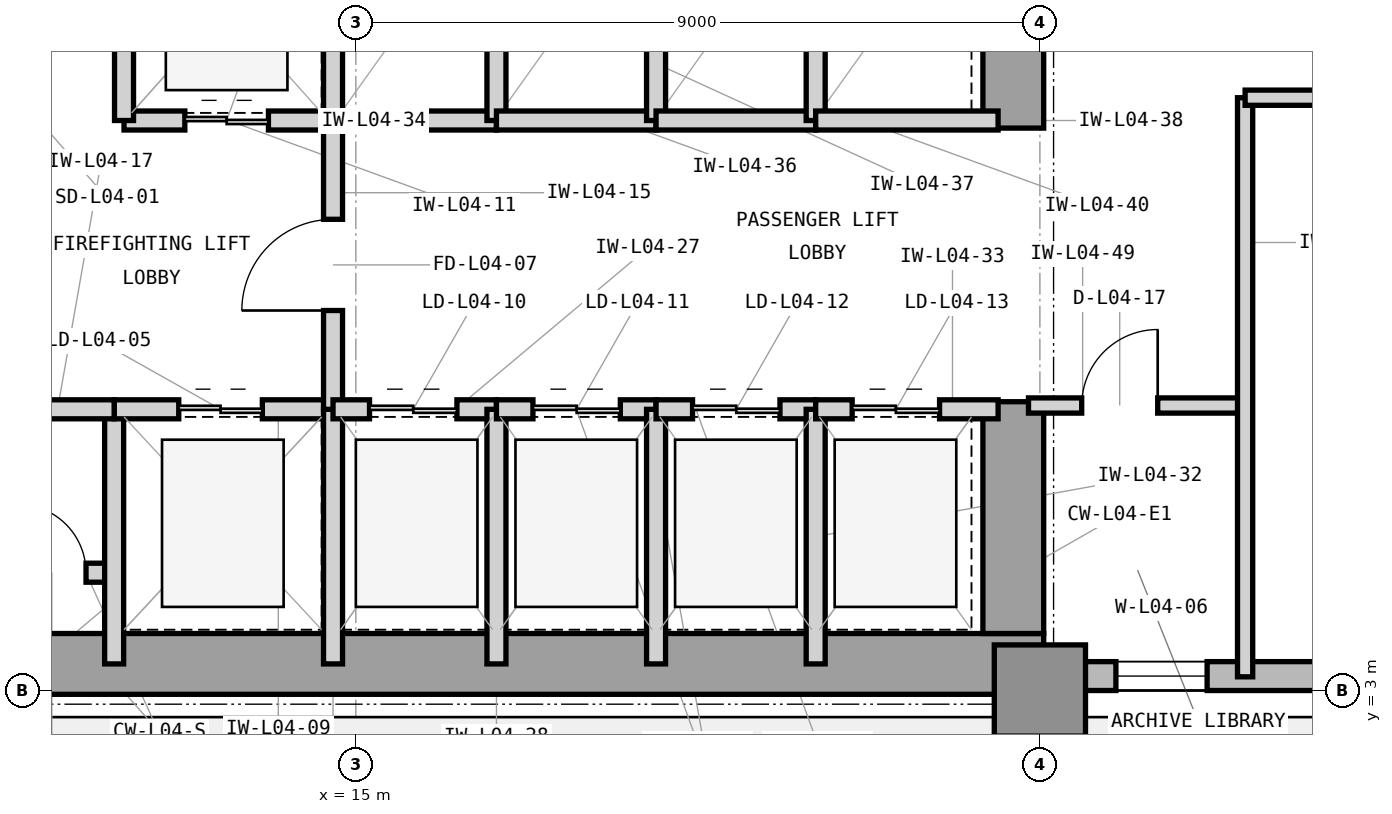
"""IFC4 building model, lengths in metres.
Left out: names, types, materials, properties, quantities, classifications, styles, units other than length and angle.
Written with IfcOpenShell. Run it as: python <this file> out.ifc"""

import sys

from ifc_helpers import new_model, si_unit, direction, frame, frame_2d, origin, origin_2d, place, context, subcontext, project, spatial, rectangle, extrude, element, fill, save


model = new_model("IFC4")
c1 = context("Model", 3, precision=1e-05, world=origin(), true_north=direction((0.0, 1.0)))
c2 = subcontext(c1, "Body", "Model", "MODEL_VIEW")
j1 = project(units=[si_unit("LENGTHUNIT", "METRE"), si_unit("PLANEANGLEUNIT", "RADIAN")], contexts=[c1])
p1 = place(None, origin())
s1 = spatial("IfcSite", under=j1, at=p1, CompositionType="ELEMENT")
p2 = place(p1, origin())
s2 = spatial("IfcBuilding", under=s1, at=p2, CompositionType="ELEMENT")
p3 = place(p2, frame((0.0, 0.0, 21.6)))
s3 = spatial("IfcBuildingStorey", under=s2, at=p3, CompositionType="ELEMENT", Elevation=21.6)
p4 = place(p3, frame((7.475, 3.35, 0.0), z_axis=(0.0, 0.0, 1.0), x_axis=(1.0, 0.0, 0.0)))
e1 = element("IfcWall", 1, at=p4, inside=s3, PredefinedType="SHEAR", context=c2, shape_type="SweptSolid", body=[
    extrude(rectangle(XDim=16.575, YDim=0.8, at=frame_2d((8.288, 0.0))), origin(), (0.0, 0.0, 1.0), 4.2),
])
p5 = place(p3, frame((23.65, 3.75, 0.0), z_axis=(0.0, 0.0, 1.0), x_axis=(0.0, 1.0, 0.0)))
e2 = element("IfcWall", 2, at=p5, inside=s3, PredefinedType="SHEAR", context=c2, shape_type="SweptSolid", body=[
    extrude(rectangle(XDim=3.05, YDim=0.8, at=frame_2d((1.525, 0.0))), origin(), (0.0, 0.0, 1.0), 4.2),
])
p6 = place(p3, frame((23.65, 10.4, 0.0), z_axis=(0.0, 0.0, 1.0), x_axis=(0.0, 1.0, 0.0)))
e3 = element("IfcWall", 3, at=p6, inside=s3, PredefinedType="SHEAR", context=c2, shape_type="SweptSolid", body=[
    extrude(rectangle(XDim=3.2, YDim=0.8, at=frame_2d((1.6, 0.0))), origin(), (0.0, 0.0, 1.0), 4.2),
])
p7 = place(p3, frame((24.0, 3.0, 0.0), z_axis=(0.0, 0.0, 1.0), x_axis=(1.0, 0.0, 0.0)))
e4 = element("IfcColumn", 4, at=p7, inside=s3, PredefinedType="COLUMN", context=c2, shape_type="SweptSolid", body=[
    extrude(rectangle(XDim=1.2, YDim=1.2, at=origin_2d()), origin(), (0.0, 0.0, 1.0), 4.2),
])
p8 = place(p3, frame((23.9, 3.19, 0.0), z_axis=(0.0, 0.0, 1.0), x_axis=(1.0, 0.0, 0.0)))
e5 = element("IfcWall", 5, at=p8, inside=s3, PredefinedType="STANDARD", context=c2, shape_type="SweptSolid", body=[
    extrude(rectangle(XDim=40.5, YDim=0.38, at=frame_2d((20.25, 0.0))), origin(), (0.0, 0.0, 1.0), 3.98),
])
p9 = place(p8, frame((1.1, 0.0, 0.85)))
e6 = element("IfcOpeningElement", 6, at=p9, cuts=e5, PredefinedType="OPENING", context=c2, shape_type="SweptSolid", body=[
    extrude(rectangle(XDim=1.2, YDim=2.45, at=frame_2d((0.6, 1.225))), frame((0.0, 0.2, 0.0), z_axis=(0.0, -1.0, 0.0), x_axis=(1.0, 0.0, 0.0)), (0.0, 0.0, 1.0), 0.4),
])
p10 = place(p8, frame((10.054, 0.0, 0.85)))
e7 = element("IfcOpeningElement", 7, at=p10, cuts=e5, PredefinedType="OPENING", context=c2, shape_type="SweptSolid", body=[
    extrude(rectangle(XDim=2.8, YDim=2.45, at=frame_2d((1.4, 1.225))), frame((0.0, 0.2, 0.0), z_axis=(0.0, -1.0, 0.0), x_axis=(1.0, 0.0, 0.0)), (0.0, 0.0, 1.0), 0.4),
])
p11 = place(p8, frame((20.304, 0.0, 0.85)))
e8 = element("IfcOpeningElement", 8, at=p11, cuts=e5, PredefinedType="OPENING", context=c2, shape_type="SweptSolid", body=[
    extrude(rectangle(XDim=2.8, YDim=2.45, at=frame_2d((1.4, 1.225))), frame((0.0, 0.2, 0.0), z_axis=(0.0, -1.0, 0.0), x_axis=(1.0, 0.0, 0.0)), (0.0, 0.0, 1.0), 0.4),
])
p12 = place(p8, frame((31.104, 0.0, 0.85)))
e9 = element("IfcOpeningElement", 9, at=p12, cuts=e5, PredefinedType="OPENING", context=c2, shape_type="SweptSolid", body=[
    extrude(rectangle(XDim=1.2, YDim=2.45, at=frame_2d((0.6, 1.225))), frame((0.0, 0.2, 0.0), z_axis=(0.0, -1.0, 0.0), x_axis=(1.0, 0.0, 0.0)), (0.0, 0.0, 1.0), 0.4),
])
p13 = place(p3, frame((10.33, 4.55, 0.0), z_axis=(0.0, 0.0, 1.0), x_axis=(1.0, 0.0, 0.0)))
e10 = element("IfcWall", 10, at=p13, inside=s3, PredefinedType="PARTITIONING", context=c2, shape_type="SweptSolid", body=[
    extrude(rectangle(XDim=1.49, YDim=0.25, at=frame_2d((0.745, 0.0))), origin(), (0.0, 0.0, 1.0), 3.97),
])
p14 = place(p13, frame((0.22, 0.0, 0.0)))
e11 = element("IfcOpeningElement", 11, at=p14, cuts=e10, PredefinedType="OPENING", context=c2, shape_type="SweptSolid", body=[
    extrude(rectangle(XDim=0.9, YDim=2.1, at=frame_2d((0.45, 1.05))), frame((0.0, 0.135, 0.0), z_axis=(0.0, -1.0, 0.0), x_axis=(1.0, 0.0, 0.0)), (0.0, 0.0, 1.0), 0.27),
])
p15 = place(p3, frame((11.82, 3.35, 0.0), z_axis=(0.0, 0.0, 1.0), x_axis=(0.0, 1.0, 0.0)))
e12 = element("IfcWall", 12, at=p15, inside=s3, PredefinedType="PARTITIONING", context=c2, shape_type="SweptSolid", body=[
    extrude(rectangle(XDim=3.35, YDim=0.25, at=frame_2d((1.675, 0.0))), origin(), (0.0, 0.0, 1.0), 3.97),
])
p16 = place(p3, frame((11.82, 6.7, 0.0), z_axis=(0.0, 0.0, 1.0), x_axis=(1.0, 0.0, 0.0)))
e13 = element("IfcWall", 13, at=p16, inside=s3, PredefinedType="PARTITIONING", context=c2, shape_type="SweptSolid", body=[
    extrude(rectangle(XDim=2.88, YDim=0.25, at=frame_2d((1.44, 0.0))), origin(), (0.0, 0.0, 1.0), 3.426),
])
p17 = place(p16, frame((0.85, 0.0, 0.0)))
e14 = element("IfcOpeningElement", 14, at=p17, cuts=e13, PredefinedType="OPENING", context=c2, shape_type="SweptSolid", body=[
    extrude(rectangle(XDim=1.1, YDim=2.25, at=frame_2d((0.55, 1.125))), frame((0.0, 0.135, 0.0), z_axis=(0.0, -1.0, 0.0), x_axis=(1.0, 0.0, 0.0)), (0.0, 0.0, 1.0), 0.27),
])
p18 = place(p3, frame((14.7, 3.35, 0.0), z_axis=(0.0, 0.0, 1.0), x_axis=(0.0, 1.0, 0.0)))
e15 = element("IfcWall", 15, at=p18, inside=s3, PredefinedType="PARTITIONING", context=c2, shape_type="SweptSolid", body=[
    extrude(rectangle(XDim=3.35, YDim=0.25, at=frame_2d((1.675, 0.0))), origin(), (0.0, 0.0, 1.0), 3.97),
])
p19 = place(p3, frame((11.95, 10.5, 0.0), z_axis=(0.0, 0.0, 1.0), x_axis=(1.0, 0.0, 0.0)))
e16 = element("IfcWall", 16, at=p19, inside=s3, PredefinedType="PARTITIONING", context=c2, shape_type="SweptSolid", body=[
    extrude(rectangle(XDim=2.75, YDim=0.25, at=frame_2d((1.375, 0.0))), origin(), (0.0, 0.0, 1.0), 3.426),
])
p20 = place(p19, frame((0.8, 0.0, 0.0)))
e17 = element("IfcOpeningElement", 17, at=p20, cuts=e16, PredefinedType="OPENING", context=c2, shape_type="SweptSolid", body=[
    extrude(rectangle(XDim=1.1, YDim=2.25, at=frame_2d((0.55, 1.125))), frame((0.0, 0.135, 0.0), z_axis=(0.0, -1.0, 0.0), x_axis=(1.0, 0.0, 0.0)), (0.0, 0.0, 1.0), 0.27),
])
for number, where, z_axis, x_axis in (
    (18, (11.95, 10.5, 0.0), (0.0, 0.0, 1.0), (0.0, 1.0, 0.0)),
    (19, (14.7, 10.5, 0.0), (0.0, 0.0, 1.0), (0.0, 1.0, 0.0)),
):
    element("IfcWall", number, at=place(p3, frame(where, z_axis=z_axis, x_axis=x_axis)), inside=s3, PredefinedType="PARTITIONING", context=c2, shape_type="SweptSolid", body=[
        extrude(rectangle(XDim=3.0, YDim=0.25, at=frame_2d((1.5, 0.0))), origin(), (0.0, 0.0, 1.0), 3.97),
    ])
p21 = place(p3, frame((14.7, 6.7, 0.0), z_axis=(0.0, 0.0, 1.0), x_axis=(0.0, 1.0, 0.0)))
e20 = element("IfcWall", 20, at=p21, inside=s3, PredefinedType="PARTITIONING", context=c2, shape_type="SweptSolid", body=[
    extrude(rectangle(XDim=3.8, YDim=0.25, at=frame_2d((1.9, 0.0))), origin(), (0.0, 0.0, 1.0), 3.97),
])
p22 = place(p21, frame((1.3, 0.0, 0.0)))
e21 = element("IfcOpeningElement", 21, at=p22, cuts=e20, PredefinedType="OPENING", context=c2, shape_type="SweptSolid", body=[
    extrude(rectangle(XDim=1.2, YDim=2.2, at=frame_2d((0.6, 1.1))), frame((0.0, 0.135, 0.0), z_axis=(0.0, -1.0, 0.0), x_axis=(1.0, 0.0, 0.0)), (0.0, 0.0, 1.0), 0.27),
])
p23 = place(p3, frame((10.33, 6.7, 0.0), z_axis=(0.0, 0.0, 1.0), x_axis=(1.0, 0.0, 0.0)))
e22 = element("IfcWall", 22, at=p23, inside=s3, PredefinedType="PARTITIONING", context=c2, shape_type="SweptSolid", body=[
    extrude(rectangle(XDim=1.49, YDim=0.25, at=frame_2d((0.745, 0.0))), origin(), (0.0, 0.0, 1.0), 3.426),
])
p24 = place(p3, frame((14.7, 6.7, 0.0), z_axis=(0.0, 0.0, 1.0), x_axis=(1.0, 0.0, 0.0)))
e23 = element("IfcWall", 23, at=p24, inside=s3, PredefinedType="PARTITIONING", context=c2, shape_type="SweptSolid", body=[
    extrude(rectangle(XDim=2.15, YDim=0.25, at=frame_2d((1.075, 0.0))), origin(), (0.0, 0.0, 1.0), 3.426),
])
p25 = place(p24, frame((0.48, 0.0, 0.0)))
e24 = element("IfcOpeningElement", 24, at=p25, cuts=e23, PredefinedType="OPENING", context=c2, shape_type="SweptSolid", body=[
    extrude(rectangle(XDim=1.15, YDim=2.25, at=frame_2d((0.575, 1.125))), frame((0.0, 0.135, 0.0), z_axis=(0.0, -1.0, 0.0), x_axis=(1.0, 0.0, 0.0)), (0.0, 0.0, 1.0), 0.27),
])
p26 = place(p3, frame((16.85, 3.35, 0.0), z_axis=(0.0, 0.0, 1.0), x_axis=(0.0, 1.0, 0.0)))
e25 = element("IfcWall", 25, at=p26, inside=s3, PredefinedType="PARTITIONING", context=c2, shape_type="SweptSolid", body=[
    extrude(rectangle(XDim=3.35, YDim=0.25, at=frame_2d((1.675, 0.0))), origin(), (0.0, 0.0, 1.0), 3.97),
])
p27 = place(p3, frame((16.85, 6.7, 0.0), z_axis=(0.0, 0.0, 1.0), x_axis=(1.0, 0.0, 0.0)))
e26 = element("IfcWall", 26, at=p27, inside=s3, PredefinedType="PARTITIONING", context=c2, shape_type="SweptSolid", body=[
    extrude(rectangle(XDim=2.1, YDim=0.25, at=frame_2d((1.05, 0.0))), origin(), (0.0, 0.0, 1.0), 3.426),
])
p28 = place(p27, frame((0.48, 0.0, 0.0)))
e27 = element("IfcOpeningElement", 27, at=p28, cuts=e26, PredefinedType="OPENING", context=c2, shape_type="SweptSolid", body=[
    extrude(rectangle(XDim=1.15, YDim=2.25, at=frame_2d((0.575, 1.125))), frame((0.0, 0.135, 0.0), z_axis=(0.0, -1.0, 0.0), x_axis=(1.0, 0.0, 0.0)), (0.0, 0.0, 1.0), 0.27),
])
p29 = place(p3, frame((18.95, 3.35, 0.0), z_axis=(0.0, 0.0, 1.0), x_axis=(0.0, 1.0, 0.0)))
e28 = element("IfcWall", 28, at=p29, inside=s3, PredefinedType="PARTITIONING", context=c2, shape_type="SweptSolid", body=[
    extrude(rectangle(XDim=3.35, YDim=0.25, at=frame_2d((1.675, 0.0))), origin(), (0.0, 0.0, 1.0), 3.97),
])
p30 = place(p3, frame((18.95, 6.7, 0.0), z_axis=(0.0, 0.0, 1.0), x_axis=(1.0, 0.0, 0.0)))
e29 = element("IfcWall", 29, at=p30, inside=s3, PredefinedType="PARTITIONING", context=c2, shape_type="SweptSolid", body=[
    extrude(rectangle(XDim=2.1, YDim=0.25, at=frame_2d((1.05, 0.0))), origin(), (0.0, 0.0, 1.0), 3.426),
])
p31 = place(p30, frame((0.48, 0.0, 0.0)))
e30 = element("IfcOpeningElement", 30, at=p31, cuts=e29, PredefinedType="OPENING", context=c2, shape_type="SweptSolid", body=[
    extrude(rectangle(XDim=1.15, YDim=2.25, at=frame_2d((0.575, 1.125))), frame((0.0, 0.135, 0.0), z_axis=(0.0, -1.0, 0.0), x_axis=(1.0, 0.0, 0.0)), (0.0, 0.0, 1.0), 0.27),
])
p32 = place(p3, frame((21.05, 3.35, 0.0), z_axis=(0.0, 0.0, 1.0), x_axis=(0.0, 1.0, 0.0)))
e31 = element("IfcWall", 31, at=p32, inside=s3, PredefinedType="PARTITIONING", context=c2, shape_type="SweptSolid", body=[
    extrude(rectangle(XDim=3.35, YDim=0.25, at=frame_2d((1.675, 0.0))), origin(), (0.0, 0.0, 1.0), 3.97),
])
p33 = place(p3, frame((21.05, 6.7, 0.0), z_axis=(0.0, 0.0, 1.0), x_axis=(1.0, 0.0, 0.0)))
e32 = element("IfcWall", 32, at=p33, inside=s3, PredefinedType="PARTITIONING", context=c2, shape_type="SweptSolid", body=[
    extrude(rectangle(XDim=2.4, YDim=0.25, at=frame_2d((1.2, 0.0))), origin(), (0.0, 0.0, 1.0), 3.426),
])
p34 = place(p33, frame((0.48, 0.0, 0.0)))
e33 = element("IfcOpeningElement", 33, at=p34, cuts=e32, PredefinedType="OPENING", context=c2, shape_type="SweptSolid", body=[
    extrude(rectangle(XDim=1.15, YDim=2.25, at=frame_2d((0.575, 1.125))), frame((0.0, 0.135, 0.0), z_axis=(0.0, -1.0, 0.0), x_axis=(1.0, 0.0, 0.0)), (0.0, 0.0, 1.0), 0.27),
])
p35 = place(p3, frame((14.7, 10.5, 0.0), z_axis=(0.0, 0.0, 1.0), x_axis=(1.0, 0.0, 0.0)))
e34 = element("IfcWall", 34, at=p35, inside=s3, PredefinedType="PARTITIONING", context=c2, shape_type="SweptSolid", body=[
    extrude(rectangle(XDim=2.15, YDim=0.25, at=frame_2d((1.075, 0.0))), origin(), (0.0, 0.0, 1.0), 3.426),
])
p36 = place(p3, frame((16.85, 10.5, 0.0), z_axis=(0.0, 0.0, 1.0), x_axis=(0.0, 1.0, 0.0)))
e35 = element("IfcWall", 35, at=p36, inside=s3, PredefinedType="PARTITIONING", context=c2, shape_type="SweptSolid", body=[
    extrude(rectangle(XDim=3.0, YDim=0.25, at=frame_2d((1.5, 0.0))), origin(), (0.0, 0.0, 1.0), 3.97),
])
p37 = place(p3, frame((16.85, 10.5, 0.0), z_axis=(0.0, 0.0, 1.0), x_axis=(1.0, 0.0, 0.0)))
e36 = element("IfcWall", 36, at=p37, inside=s3, PredefinedType="PARTITIONING", context=c2, shape_type="SweptSolid", body=[
    extrude(rectangle(XDim=2.1, YDim=0.25, at=frame_2d((1.05, 0.0))), origin(), (0.0, 0.0, 1.0), 3.426),
])
p38 = place(p3, frame((18.95, 10.5, 0.0), z_axis=(0.0, 0.0, 1.0), x_axis=(0.0, 1.0, 0.0)))
e37 = element("IfcWall", 37, at=p38, inside=s3, PredefinedType="PARTITIONING", context=c2, shape_type="SweptSolid", body=[
    extrude(rectangle(XDim=3.0, YDim=0.25, at=frame_2d((1.5, 0.0))), origin(), (0.0, 0.0, 1.0), 3.97),
])
p39 = place(p3, frame((18.95, 10.5, 0.0), z_axis=(0.0, 0.0, 1.0), x_axis=(1.0, 0.0, 0.0)))
e38 = element("IfcWall", 38, at=p39, inside=s3, PredefinedType="PARTITIONING", context=c2, shape_type="SweptSolid", body=[
    extrude(rectangle(XDim=2.1, YDim=0.25, at=frame_2d((1.05, 0.0))), origin(), (0.0, 0.0, 1.0), 3.426),
])
p40 = place(p3, frame((21.05, 10.5, 0.0), z_axis=(0.0, 0.0, 1.0), x_axis=(0.0, 1.0, 0.0)))
e39 = element("IfcWall", 39, at=p40, inside=s3, PredefinedType="PARTITIONING", context=c2, shape_type="SweptSolid", body=[
    extrude(rectangle(XDim=3.0, YDim=0.25, at=frame_2d((1.5, 0.0))), origin(), (0.0, 0.0, 1.0), 3.97),
])
p41 = place(p3, frame((21.05, 10.5, 0.0), z_axis=(0.0, 0.0, 1.0), x_axis=(1.0, 0.0, 0.0)))
e40 = element("IfcWall", 40, at=p41, inside=s3, PredefinedType="PARTITIONING", context=c2, shape_type="SweptSolid", body=[
    extrude(rectangle(XDim=2.4, YDim=0.25, at=frame_2d((1.2, 0.0))), origin(), (0.0, 0.0, 1.0), 3.426),
])
p42 = place(p3, frame((23.85, 6.75, 0.0), z_axis=(0.0, 0.0, 1.0), x_axis=(1.0, 0.0, 0.0)))
e41 = element("IfcWall", 41, at=p42, inside=s3, PredefinedType="PARTITIONING", context=c2, shape_type="SweptSolid", body=[
    extrude(rectangle(XDim=2.85, YDim=0.2, at=frame_2d((1.425, 0.0))), origin(), (0.0, 0.0, 1.0), 3.97),
])
p43 = place(p42, frame((0.7, 0.0, 0.0)))
e42 = element("IfcOpeningElement", 42, at=p43, cuts=e41, PredefinedType="OPENING", context=c2, shape_type="SweptSolid", body=[
    extrude(rectangle(XDim=1.0, YDim=2.15, at=frame_2d((0.5, 1.075))), frame((0.0, 0.11, 0.0), z_axis=(0.0, -1.0, 0.0), x_axis=(1.0, 0.0, 0.0)), (0.0, 0.0, 1.0), 0.22),
])
p44 = place(p3, frame((26.7, 3.18, 0.0), z_axis=(0.0, 0.0, 1.0), x_axis=(0.0, 1.0, 0.0)))
e43 = element("IfcWall", 43, at=p44, inside=s3, PredefinedType="PARTITIONING", context=c2, shape_type="SweptSolid", body=[
    extrude(rectangle(XDim=7.62, YDim=0.2, at=frame_2d((3.81, 0.0))), origin(), (0.0, 0.0, 1.0), 3.97),
])
p45 = place(p3, frame((26.7, 10.8, 0.0), z_axis=(0.0, 0.0, 1.0), x_axis=(1.0, 0.0, 0.0)))
e44 = element("IfcWall", 44, at=p45, inside=s3, PredefinedType="PARTITIONING", context=c2, shape_type="SweptSolid", body=[
    extrude(rectangle(XDim=15.0, YDim=0.2, at=frame_2d((7.5, 0.0))), origin(), (0.0, 0.0, 1.0), 3.97),
])
p46 = place(p45, frame((6.5, 0.0, 0.0)))
e45 = element("IfcOpeningElement", 45, at=p46, cuts=e44, PredefinedType="OPENING", context=c2, shape_type="SweptSolid", body=[
    extrude(rectangle(XDim=2.0, YDim=2.5, at=frame_2d((1.0, 1.25))), frame((0.0, 0.11, 0.0), z_axis=(0.0, -1.0, 0.0), x_axis=(1.0, 0.0, 0.0)), (0.0, 0.0, 1.0), 0.22),
])
p47 = place(p14, origin())
e46 = element("IfcDoor", 46, at=p47, inside=s3, OperationType="SINGLE_SWING_LEFT", PredefinedType="TRAPDOOR", context=c2, shape_type="SweptSolid", body=[
    extrude(rectangle(XDim=0.9, YDim=2.1, at=frame_2d((0.45, 1.05))), frame((0.0, 0.025, 0.0), z_axis=(0.0, -1.0, 0.0), x_axis=(1.0, 0.0, 0.0)), (0.0, 0.0, 1.0), 0.05),
])
fill(e11, e46)
p48 = place(p17, origin())
e47 = element("IfcDoor", 47, at=p48, inside=s3, OperationType="DOUBLE_DOOR_SLIDING", PredefinedType="DOOR", context=c2, shape_type="SweptSolid", body=[
    extrude(rectangle(XDim=1.1, YDim=2.25, at=frame_2d((0.55, 1.125))), frame((0.0, 0.025, 0.0), z_axis=(0.0, -1.0, 0.0), x_axis=(1.0, 0.0, 0.0)), (0.0, 0.0, 1.0), 0.05),
])
fill(e14, e47)
p49 = place(p20, origin())
e48 = element("IfcDoor", 48, at=p49, inside=s3, OperationType="DOUBLE_DOOR_SLIDING", PredefinedType="DOOR", context=c2, shape_type="SweptSolid", body=[
    extrude(rectangle(XDim=1.1, YDim=2.25, at=frame_2d((0.55, 1.125))), frame((0.0, 0.025, 0.0), z_axis=(0.0, -1.0, 0.0), x_axis=(1.0, 0.0, 0.0)), (0.0, 0.0, 1.0), 0.05),
])
fill(e17, e48)
p50 = place(p22, origin())
e49 = element("IfcDoor", 49, at=p50, inside=s3, OperationType="SINGLE_SWING_LEFT", PredefinedType="DOOR", context=c2, shape_type="SweptSolid", body=[
    extrude(rectangle(XDim=1.2, YDim=2.2, at=frame_2d((0.6, 1.1))), frame((0.0, 0.025, 0.0), z_axis=(0.0, -1.0, 0.0), x_axis=(1.0, 0.0, 0.0)), (0.0, 0.0, 1.0), 0.05),
])
fill(e21, e49)
p51 = place(p25, origin())
e50 = element("IfcDoor", 50, at=p51, inside=s3, OperationType="DOUBLE_DOOR_SLIDING", PredefinedType="DOOR", context=c2, shape_type="SweptSolid", body=[
    extrude(rectangle(XDim=1.15, YDim=2.25, at=frame_2d((0.575, 1.125))), frame((0.0, 0.025, 0.0), z_axis=(0.0, -1.0, 0.0), x_axis=(1.0, 0.0, 0.0)), (0.0, 0.0, 1.0), 0.05),
])
fill(e24, e50)
p52 = place(p28, origin())
e51 = element("IfcDoor", 51, at=p52, inside=s3, OperationType="DOUBLE_DOOR_SLIDING", PredefinedType="DOOR", context=c2, shape_type="SweptSolid", body=[
    extrude(rectangle(XDim=1.15, YDim=2.25, at=frame_2d((0.575, 1.125))), frame((0.0, 0.025, 0.0), z_axis=(0.0, -1.0, 0.0), x_axis=(1.0, 0.0, 0.0)), (0.0, 0.0, 1.0), 0.05),
])
fill(e27, e51)
p53 = place(p31, origin())
e52 = element("IfcDoor", 52, at=p53, inside=s3, OperationType="DOUBLE_DOOR_SLIDING", PredefinedType="DOOR", context=c2, shape_type="SweptSolid", body=[
    extrude(rectangle(XDim=1.15, YDim=2.25, at=frame_2d((0.575, 1.125))), frame((0.0, 0.025, 0.0), z_axis=(0.0, -1.0, 0.0), x_axis=(1.0, 0.0, 0.0)), (0.0, 0.0, 1.0), 0.05),
])
fill(e30, e52)
p54 = place(p34, origin())
e53 = element("IfcDoor", 53, at=p54, inside=s3, OperationType="DOUBLE_DOOR_SLIDING", PredefinedType="DOOR", context=c2, shape_type="SweptSolid", body=[
    extrude(rectangle(XDim=1.15, YDim=2.25, at=frame_2d((0.575, 1.125))), frame((0.0, 0.025, 0.0), z_axis=(0.0, -1.0, 0.0), x_axis=(1.0, 0.0, 0.0)), (0.0, 0.0, 1.0), 0.05),
])
fill(e33, e53)
p55 = place(p43, origin())
e54 = element("IfcDoor", 54, at=p55, inside=s3, OperationType="SINGLE_SWING_RIGHT", PredefinedType="DOOR", context=c2, shape_type="SweptSolid", body=[
    extrude(rectangle(XDim=1.0, YDim=2.15, at=frame_2d((0.5, 1.075))), frame((0.0, 0.025, 0.0), z_axis=(0.0, -1.0, 0.0), x_axis=(1.0, 0.0, 0.0)), (0.0, 0.0, 1.0), 0.05),
])
fill(e42, e54)
p56 = place(p9, origin())
e55 = element("IfcWindow", 55, at=p56, inside=s3, PartitioningType="SINGLE_PANEL", PredefinedType="WINDOW", context=c2, shape_type="SweptSolid", body=[
    extrude(rectangle(XDim=1.2, YDim=2.45, at=frame_2d((0.6, 1.225))), frame((0.0, 0.11, 0.0), z_axis=(0.0, -1.0, 0.0), x_axis=(1.0, 0.0, 0.0)), (0.0, 0.0, 1.0), 0.06),
])
fill(e6, e55)
save(model, sys.argv[1])
